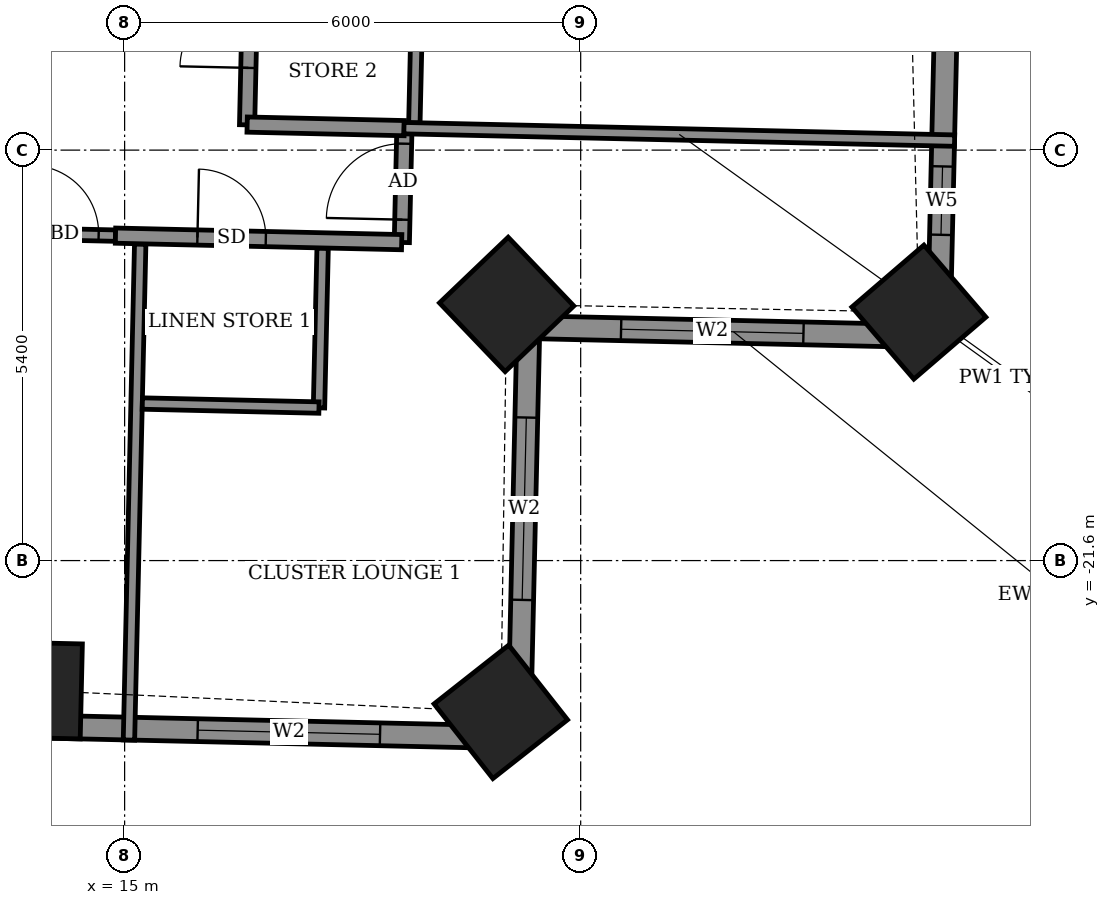
"""IFC4 building model, lengths in metres.
Left out: names, types, materials, properties, quantities, classifications, styles, units other than length and angle.
Written with IfcOpenShell. Run it as: python <this file> out.ifc"""

import sys

from ifc_helpers import new_model, si_unit, direction, frame, frame_2d, origin, origin_2d, place, context, subcontext, project, spatial, rectangle, extrude, element, fill, save


model = new_model("IFC4")
c1 = context("Model", 3, precision=1e-05, world=origin(), true_north=direction((0.0, 1.0)))
c2 = subcontext(c1, "Body", "Model", "MODEL_VIEW")
j1 = project(units=[si_unit("LENGTHUNIT", "METRE"), si_unit("PLANEANGLEUNIT", "RADIAN")], contexts=[c1])
p1 = place(None, origin())
s1 = spatial("IfcSite", under=j1, at=p1, CompositionType="ELEMENT")
p2 = place(p1, origin())
s2 = spatial("IfcBuilding", under=s1, at=p2, CompositionType="ELEMENT")
p3 = place(p2, frame((0.0, 0.0, 163.5)))
s3 = spatial("IfcBuildingStorey", under=s2, at=p3, CompositionType="ELEMENT", Elevation=163.5)
for number, where, z_axis, x_axis in (
    (1, (13.805, -23.307, -0.55), (0.0, 0.0, 1.0), (1.0, -0.023, 0.0)),
    (2, (19.949, -23.59, -0.55), (0.0, 0.0, 1.0), (0.786, 0.619, 0.0)),
    (3, (20.026, -18.23, -0.55), (0.0, 0.0, 1.0), (0.723, 0.691, 0.0)),
    (4, (25.449, -18.331, -0.55), (0.0, 0.0, 1.0), (0.758, 0.652, 0.0)),
):
    element("IfcColumn", number, at=place(p3, frame(where, z_axis=z_axis, x_axis=x_axis)), inside=s3, PredefinedType="COLUMN", context=c2, shape_type="SweptSolid", body=[
        extrude(rectangle(XDim=1.25, YDim=1.25, at=origin_2d()), origin(), (0.0, 0.0, 1.0), 3.6),
    ])
p4 = place(p3, frame((25.71, -18.651, 0.0), z_axis=(0.0, 0.0, 1.0), x_axis=(0.02274444447, 0.999741311663, 0.0)))
e5 = element("IfcWall", 5, at=p4, inside=s3, PredefinedType="SOLIDWALL", context=c2, shape_type="SweptSolid", body=[
    extrude(rectangle(XDim=9.628, YDim=0.3, at=frame_2d((4.814, 0.0))), origin(), (0.0, 0.0, 1.0), 2.55),
])
p5 = place(p4, frame((1.337, 0.0, 0.9)))
e6 = element("IfcOpeningElement", 6, at=p5, cuts=e5, PredefinedType="OPENING", context=c2, shape_type="SweptSolid", body=[
    extrude(rectangle(XDim=0.9, YDim=1.5, at=frame_2d((0.45, 0.75))), frame((0.0, 0.16, 0.0), z_axis=(0.0, -1.0, 0.0), x_axis=(1.0, 0.0, 0.0)), (0.0, 0.0, 1.0), 0.32),
])
p6 = place(p4, frame((5.481, 0.0, 0.0)))
e7 = element("IfcOpeningElement", 7, at=p6, cuts=e5, PredefinedType="OPENING", context=c2, shape_type="SweptSolid", body=[
    extrude(rectangle(XDim=1.2, YDim=2.4, at=frame_2d((0.6, 1.2))), frame((0.0, 0.16, 0.0), z_axis=(0.0, -1.0, 0.0), x_axis=(1.0, 0.0, 0.0)), (0.0, 0.0, 1.0), 0.32),
])
p7 = place(p4, frame((7.512, 0.0, 0.9)))
e8 = element("IfcOpeningElement", 8, at=p7, cuts=e5, PredefinedType="OPENING", context=c2, shape_type="SweptSolid", body=[
    extrude(rectangle(XDim=1.2, YDim=1.5, at=frame_2d((0.6, 0.75))), frame((0.0, 0.16, 0.0), z_axis=(0.0, -1.0, 0.0), x_axis=(1.0, 0.0, 0.0)), (0.0, 0.0, 1.0), 0.32),
])
p8 = place(p3, frame((-18.781, -23.043, 0.0), z_axis=(0.0, 0.0, 1.0), x_axis=(0.999742794992, -0.022679150367, 0.0)))
e9 = element("IfcWall", 9, at=p8, inside=s3, PredefinedType="SOLIDWALL", context=c2, shape_type="SweptSolid", body=[
    extrude(rectangle(XDim=38.98, YDim=0.3, at=frame_2d((19.49, 0.0))), origin(), (0.0, 0.0, 1.0), 3.05),
])
p9 = place(p8, frame((1.215, 0.0, 0.0)))
e10 = element("IfcOpeningElement", 10, at=p9, cuts=e9, PredefinedType="OPENING", context=c2, shape_type="SweptSolid", body=[
    extrude(rectangle(XDim=1.5, YDim=2.4, at=frame_2d((0.75, 1.2))), frame((0.0, 0.16, 0.0), z_axis=(0.0, -1.0, 0.0), x_axis=(1.0, 0.0, 0.0)), (0.0, 0.0, 1.0), 0.32),
])
p10 = place(p8, frame((3.811, 0.0, 0.0)))
e11 = element("IfcOpeningElement", 11, at=p10, cuts=e9, PredefinedType="OPENING", context=c2, shape_type="SweptSolid", body=[
    extrude(rectangle(XDim=1.5, YDim=2.4, at=frame_2d((0.75, 1.2))), frame((0.0, 0.16, 0.0), z_axis=(0.0, -1.0, 0.0), x_axis=(1.0, 0.0, 0.0)), (0.0, 0.0, 1.0), 0.32),
])
p11 = place(p8, frame((9.0, 0.0, 0.0)))
e12 = element("IfcOpeningElement", 12, at=p11, cuts=e9, PredefinedType="OPENING", context=c2, shape_type="SweptSolid", body=[
    extrude(rectangle(XDim=1.5, YDim=2.4, at=frame_2d((0.75, 1.2))), frame((0.0, 0.16, 0.0), z_axis=(0.0, -1.0, 0.0), x_axis=(1.0, 0.0, 0.0)), (0.0, 0.0, 1.0), 0.32),
])
p12 = place(p8, frame((14.109, 0.0, 0.0)))
e13 = element("IfcOpeningElement", 13, at=p12, cuts=e9, PredefinedType="OPENING", context=c2, shape_type="SweptSolid", body=[
    extrude(rectangle(XDim=1.5, YDim=2.4, at=frame_2d((0.75, 1.2))), frame((0.0, 0.16, 0.0), z_axis=(0.0, -1.0, 0.0), x_axis=(1.0, 0.0, 0.0)), (0.0, 0.0, 1.0), 0.32),
])
p13 = place(p8, frame((17.008, 0.0, 0.0)))
e14 = element("IfcOpeningElement", 14, at=p13, cuts=e9, PredefinedType="OPENING", context=c2, shape_type="SweptSolid", body=[
    extrude(rectangle(XDim=1.5, YDim=2.4, at=frame_2d((0.75, 1.2))), frame((0.0, 0.16, 0.0), z_axis=(0.0, -1.0, 0.0), x_axis=(1.0, 0.0, 0.0)), (0.0, 0.0, 1.0), 0.32),
])
p14 = place(p8, frame((22.225, 0.0, 0.0)))
e15 = element("IfcOpeningElement", 15, at=p14, cuts=e9, PredefinedType="OPENING", context=c2, shape_type="SweptSolid", body=[
    extrude(rectangle(XDim=1.5, YDim=2.4, at=frame_2d((0.75, 1.2))), frame((0.0, 0.16, 0.0), z_axis=(0.0, -1.0, 0.0), x_axis=(1.0, 0.0, 0.0)), (0.0, 0.0, 1.0), 0.32),
])
p15 = place(p8, frame((27.181, 0.0, 0.0)))
e16 = element("IfcOpeningElement", 16, at=p15, cuts=e9, PredefinedType="OPENING", context=c2, shape_type="SweptSolid", body=[
    extrude(rectangle(XDim=1.5, YDim=2.4, at=frame_2d((0.75, 1.2))), frame((0.0, 0.16, 0.0), z_axis=(0.0, -1.0, 0.0), x_axis=(1.0, 0.0, 0.0)), (0.0, 0.0, 1.0), 0.32),
])
p16 = place(p8, frame((30.079, 0.0, 0.0)))
e17 = element("IfcOpeningElement", 17, at=p16, cuts=e9, PredefinedType="OPENING", context=c2, shape_type="SweptSolid", body=[
    extrude(rectangle(XDim=1.5, YDim=2.4, at=frame_2d((0.75, 1.2))), frame((0.0, 0.16, 0.0), z_axis=(0.0, -1.0, 0.0), x_axis=(1.0, 0.0, 0.0)), (0.0, 0.0, 1.0), 0.32),
])
p17 = place(p8, frame((34.751, 0.0, 0.9)))
e18 = element("IfcOpeningElement", 18, at=p17, cuts=e9, PredefinedType="OPENING", context=c2, shape_type="SweptSolid", body=[
    extrude(rectangle(XDim=2.4, YDim=1.5, at=frame_2d((1.2, 0.75))), frame((0.0, 0.16, 0.0), z_axis=(0.0, -1.0, 0.0), x_axis=(1.0, 0.0, 0.0)), (0.0, 0.0, 1.0), 0.32),
])
p18 = place(p3, frame((20.189, -23.927, 0.0), z_axis=(0.0, 0.0, 1.0), x_axis=(0.022789195272, 0.999740292565, 0.0)))
e19 = element("IfcWall", 19, at=p18, inside=s3, PredefinedType="SOLIDWALL", context=c2, shape_type="SweptSolid", body=[
    extrude(rectangle(XDim=5.399, YDim=0.3, at=frame_2d((2.7, 0.0))), origin(), (0.0, 0.0, 1.0), 2.55),
])
p19 = place(p18, frame((1.81, 0.0, 0.9)))
e20 = element("IfcOpeningElement", 20, at=p19, cuts=e19, PredefinedType="OPENING", context=c2, shape_type="SweptSolid", body=[
    extrude(rectangle(XDim=2.4, YDim=1.5, at=frame_2d((1.2, 0.75))), frame((0.0, 0.16, 0.0), z_axis=(0.0, -1.0, 0.0), x_axis=(1.0, 0.0, 0.0)), (0.0, 0.0, 1.0), 0.32),
])
p20 = place(p3, frame((20.312, -18.529, 0.0), z_axis=(0.0, 0.0, 1.0), x_axis=(0.999745417973, -0.02256322766, 0.0)))
e21 = element("IfcWall", 21, at=p20, inside=s3, PredefinedType="SOLIDWALL", context=c2, shape_type="SweptSolid", body=[
    extrude(rectangle(XDim=5.399, YDim=0.3, at=frame_2d((2.7, 0.0))), origin(), (0.0, 0.0, 1.0), 2.55),
])
p21 = place(p20, frame((1.22, 0.0, 0.9)))
e22 = element("IfcOpeningElement", 22, at=p21, cuts=e21, PredefinedType="OPENING", context=c2, shape_type="SweptSolid", body=[
    extrude(rectangle(XDim=2.4, YDim=1.5, at=frame_2d((1.2, 0.75))), frame((0.0, 0.16, 0.0), z_axis=(0.0, -1.0, 0.0), x_axis=(1.0, 0.0, 0.0)), (0.0, 0.0, 1.0), 0.32),
])
p22 = place(p3, frame((15.057, -23.961, 0.0), z_axis=(0.0, 0.0, 1.0), x_axis=(0.022709507457, 0.999742105881, 0.0)))
e23 = element("IfcWall", 23, at=p22, inside=s3, PredefinedType="PARTITIONING", context=c2, shape_type="SweptSolid", body=[
    extrude(rectangle(XDim=6.526, YDim=0.15, at=frame_2d((3.263, 0.0))), origin(), (0.0, 0.0, 1.0), 2.55),
])
p23 = place(p3, frame((17.557, -19.591, 0.0), z_axis=(0.0, 0.0, 1.0), x_axis=(0.022895647347, 0.999737860308, 0.0)))
e24 = element("IfcWall", 24, at=p23, inside=s3, PredefinedType="PARTITIONING", context=c2, shape_type="SweptSolid", body=[
    extrude(rectangle(XDim=2.101, YDim=0.15, at=frame_2d((1.05, 0.0))), origin(), (0.0, 0.0, 1.0), 3.05),
])
p24 = place(p3, frame((15.233, -19.534, 0.0), z_axis=(0.0, 0.0, 1.0), x_axis=(0.999740260747, -0.02279059109, 0.0)))
e25 = element("IfcWall", 25, at=p24, inside=s3, PredefinedType="PARTITIONING", context=c2, shape_type="SweptSolid", body=[
    extrude(rectangle(XDim=2.324, YDim=0.15, at=frame_2d((1.162, 0.0))), origin(), (0.0, 0.0, 1.0), 3.05),
])
p25 = place(p3, frame((18.647, -17.415, 0.0), z_axis=(0.0, 0.0, 1.0), x_axis=(0.022617910375, 0.999744182344, 0.0)))
e26 = element("IfcWall", 26, at=p25, inside=s3, PredefinedType="PARTITIONING", context=c2, shape_type="SweptSolid", body=[
    extrude(rectangle(XDim=1.5, YDim=0.2, at=frame_2d((0.75, 0.0))), origin(), (0.0, 0.0, 1.0), 3.05),
])
p26 = place(p25, frame((0.3, 0.0, 0.0)))
e27 = element("IfcOpeningElement", 27, at=p26, cuts=e26, PredefinedType="OPENING", context=c2, shape_type="SweptSolid", body=[
    extrude(rectangle(XDim=1.0, YDim=2.1, at=frame_2d((0.5, 1.05))), frame((0.0, 0.11, 0.0), z_axis=(0.0, -1.0, 0.0), x_axis=(1.0, 0.0, 0.0)), (0.0, 0.0, 1.0), 0.22),
])
p27 = place(p3, frame((-15.649, -16.633, 0.0), z_axis=(0.0, 0.0, 1.0), x_axis=(0.999743261737, -0.022658565952, 0.0)))
e28 = element("IfcWall", 28, at=p27, inside=s3, PredefinedType="PARTITIONING", context=c2, shape_type="SweptSolid", body=[
    extrude(rectangle(XDim=30.536, YDim=0.15, at=frame_2d((15.268, 0.0))), origin(), (0.0, 0.0, 1.0), 3.05),
])
p28 = place(p27, frame((3.09, 0.0, 0.0)))
e29 = element("IfcOpeningElement", 29, at=p28, cuts=e28, PredefinedType="OPENING", context=c2, shape_type="SweptSolid", body=[
    extrude(rectangle(XDim=0.9, YDim=2.1, at=frame_2d((0.45, 1.05))), frame((0.0, 0.085, 0.0), z_axis=(0.0, -1.0, 0.0), x_axis=(1.0, 0.0, 0.0)), (0.0, 0.0, 1.0), 0.17),
])
p29 = place(p27, frame((5.115, 0.0, 0.0)))
e30 = element("IfcOpeningElement", 30, at=p29, cuts=e28, PredefinedType="OPENING", context=c2, shape_type="SweptSolid", body=[
    extrude(rectangle(XDim=0.9, YDim=2.1, at=frame_2d((0.45, 1.05))), frame((0.0, 0.085, 0.0), z_axis=(0.0, -1.0, 0.0), x_axis=(1.0, 0.0, 0.0)), (0.0, 0.0, 1.0), 0.17),
])
p30 = place(p27, frame((11.94, 0.0, 0.0)))
e31 = element("IfcOpeningElement", 31, at=p30, cuts=e28, PredefinedType="OPENING", context=c2, shape_type="SweptSolid", body=[
    extrude(rectangle(XDim=0.9, YDim=2.1, at=frame_2d((0.45, 1.05))), frame((0.0, 0.085, 0.0), z_axis=(0.0, -1.0, 0.0), x_axis=(1.0, 0.0, 0.0)), (0.0, 0.0, 1.0), 0.17),
])
p31 = place(p27, frame((13.965, 0.0, 0.0)))
e32 = element("IfcOpeningElement", 32, at=p31, cuts=e28, PredefinedType="OPENING", context=c2, shape_type="SweptSolid", body=[
    extrude(rectangle(XDim=0.9, YDim=2.1, at=frame_2d((0.45, 1.05))), frame((0.0, 0.085, 0.0), z_axis=(0.0, -1.0, 0.0), x_axis=(1.0, 0.0, 0.0)), (0.0, 0.0, 1.0), 0.17),
])
p32 = place(p27, frame((20.74, 0.0, 0.0)))
e33 = element("IfcOpeningElement", 33, at=p32, cuts=e28, PredefinedType="OPENING", context=c2, shape_type="SweptSolid", body=[
    extrude(rectangle(XDim=0.9, YDim=2.1, at=frame_2d((0.45, 1.05))), frame((0.0, 0.085, 0.0), z_axis=(0.0, -1.0, 0.0), x_axis=(1.0, 0.0, 0.0)), (0.0, 0.0, 1.0), 0.17),
])
p33 = place(p27, frame((22.665, 0.0, 0.0)))
e34 = element("IfcOpeningElement", 34, at=p33, cuts=e28, PredefinedType="OPENING", context=c2, shape_type="SweptSolid", body=[
    extrude(rectangle(XDim=0.9, YDim=2.1, at=frame_2d((0.45, 1.05))), frame((0.0, 0.085, 0.0), z_axis=(0.0, -1.0, 0.0), x_axis=(1.0, 0.0, 0.0)), (0.0, 0.0, 1.0), 0.17),
])
p34 = place(p27, frame((29.415, 0.0, 0.0)))
e35 = element("IfcOpeningElement", 35, at=p34, cuts=e28, PredefinedType="OPENING", context=c2, shape_type="SweptSolid", body=[
    extrude(rectangle(XDim=0.9, YDim=2.1, at=frame_2d((0.45, 1.05))), frame((0.0, 0.085, 0.0), z_axis=(0.0, -1.0, 0.0), x_axis=(1.0, 0.0, 0.0)), (0.0, 0.0, 1.0), 0.17),
])
p35 = place(p3, frame((14.88, -17.325, 0.0), z_axis=(0.0, 0.0, 1.0), x_axis=(0.999739622, -0.022818593369, 0.0)))
e36 = element("IfcWall", 36, at=p35, inside=s3, PredefinedType="PARTITIONING", context=c2, shape_type="SweptSolid", body=[
    extrude(rectangle(XDim=3.766, YDim=0.2, at=frame_2d((1.883, 0.0))), origin(), (0.0, 0.0, 1.0), 3.05),
])
p36 = place(p35, frame((1.078, 0.0, 0.0)))
e37 = element("IfcOpeningElement", 37, at=p36, cuts=e36, PredefinedType="OPENING", context=c2, shape_type="SweptSolid", body=[
    extrude(rectangle(XDim=0.9, YDim=2.1, at=frame_2d((0.45, 1.05))), frame((0.0, 0.11, 0.0), z_axis=(0.0, -1.0, 0.0), x_axis=(1.0, 0.0, 0.0)), (0.0, 0.0, 1.0), 0.22),
])
p37 = place(p3, frame((16.611, -15.868, 0.0), z_axis=(0.0, 0.0, 1.0), x_axis=(0.022698399288, 0.999742358145, 0.0)))
e38 = element("IfcWall", 38, at=p37, inside=s3, PredefinedType="PARTITIONING", context=c2, shape_type="SweptSolid", body=[
    extrude(rectangle(XDim=8.196, YDim=0.2, at=frame_2d((4.098, 0.0))), origin(), (0.0, 0.0, 1.0), 3.05),
])
p38 = place(p37, frame((2.95, 0.0, 0.0)))
e39 = element("IfcOpeningElement", 39, at=p38, cuts=e38, PredefinedType="OPENING", context=c2, shape_type="SweptSolid", body=[
    extrude(rectangle(XDim=1.0, YDim=2.1, at=frame_2d((0.5, 1.05))), frame((0.0, 0.11, 0.0), z_axis=(0.0, -1.0, 0.0), x_axis=(1.0, 0.0, 0.0)), (0.0, 0.0, 1.0), 0.22),
])
p39 = place(p37, frame((0.75, 0.0, 0.0)))
e40 = element("IfcOpeningElement", 40, at=p39, cuts=e38, PredefinedType="OPENING", context=c2, shape_type="SweptSolid", body=[
    extrude(rectangle(XDim=0.9, YDim=2.1, at=frame_2d((0.45, 1.05))), frame((0.0, 0.11, 0.0), z_axis=(0.0, -1.0, 0.0), x_axis=(1.0, 0.0, 0.0)), (0.0, 0.0, 1.0), 0.22),
])
p40 = place(p37, frame((5.761, 0.0, 0.0)))
e41 = element("IfcOpeningElement", 41, at=p40, cuts=e38, PredefinedType="OPENING", context=c2, shape_type="SweptSolid", body=[
    extrude(rectangle(XDim=1.0, YDim=2.1, at=frame_2d((0.5, 1.05))), frame((0.0, 0.11, 0.0), z_axis=(0.0, -1.0, 0.0), x_axis=(1.0, 0.0, 0.0)), (0.0, 0.0, 1.0), 0.22),
])
p41 = place(p3, frame((18.812, -15.843, 0.0), z_axis=(0.0, 0.0, 1.0), x_axis=(0.02279059109, 0.999740260747, 0.0)))
e42 = element("IfcWall", 42, at=p41, inside=s3, PredefinedType="PARTITIONING", context=c2, shape_type="SweptSolid", body=[
    extrude(rectangle(XDim=2.324, YDim=0.15, at=frame_2d((1.162, 0.0))), origin(), (0.0, 0.0, 1.0), 3.05),
])
p42 = place(p3, frame((16.612, -15.864, 0.0), z_axis=(0.0, 0.0, 1.0), x_axis=(0.999742931749, -0.02267312106, 0.0)))
e43 = element("IfcWall", 43, at=p42, inside=s3, PredefinedType="PARTITIONING", context=c2, shape_type="SweptSolid", body=[
    extrude(rectangle(XDim=2.067, YDim=0.2, at=frame_2d((1.034, 0.0))), origin(), (0.0, 0.0, 1.0), 3.05),
])
p43 = place(p3, frame((18.675, -15.911, 0.0), z_axis=(0.0, 0.0, 1.0), x_axis=(0.999743624132, -0.022642570706, 0.0)))
e44 = element("IfcWall", 44, at=p43, inside=s3, PredefinedType="PARTITIONING", context=c2, shape_type="SweptSolid", body=[
    extrude(rectangle(XDim=7.246, YDim=0.15, at=frame_2d((3.623, 0.0))), origin(), (0.0, 0.0, 1.0), 2.55),
])
p44 = place(p5, origin())
e45 = element("IfcWindow", 45, at=p44, inside=s3, PartitioningType="SINGLE_PANEL", PredefinedType="WINDOW", context=c2, shape_type="SweptSolid", body=[
    extrude(rectangle(XDim=0.9, YDim=1.5, at=frame_2d((0.45, 0.75))), frame((0.0, 0.03, 0.0), z_axis=(0.0, -1.0, 0.0), x_axis=(1.0, 0.0, 0.0)), (0.0, 0.0, 1.0), 0.06),
])
fill(e6, e45)
p45 = place(p17, origin())
e46 = element("IfcWindow", 46, at=p45, inside=s3, PartitioningType="DOUBLE_PANEL_VERTICAL", PredefinedType="WINDOW", context=c2, shape_type="SweptSolid", body=[
    extrude(rectangle(XDim=2.4, YDim=1.5, at=frame_2d((1.2, 0.75))), frame((0.0, 0.03, 0.0), z_axis=(0.0, -1.0, 0.0), x_axis=(1.0, 0.0, 0.0)), (0.0, 0.0, 1.0), 0.06),
])
fill(e18, e46)
p46 = place(p19, origin())
e47 = element("IfcWindow", 47, at=p46, inside=s3, PartitioningType="DOUBLE_PANEL_VERTICAL", PredefinedType="WINDOW", context=c2, shape_type="SweptSolid", body=[
    extrude(rectangle(XDim=2.4, YDim=1.5, at=frame_2d((1.2, 0.75))), frame((0.0, 0.03, 0.0), z_axis=(0.0, -1.0, 0.0), x_axis=(1.0, 0.0, 0.0)), (0.0, 0.0, 1.0), 0.06),
])
fill(e20, e47)
p47 = place(p21, origin())
e48 = element("IfcWindow", 48, at=p47, inside=s3, PartitioningType="DOUBLE_PANEL_VERTICAL", PredefinedType="WINDOW", context=c2, shape_type="SweptSolid", body=[
    extrude(rectangle(XDim=2.4, YDim=1.5, at=frame_2d((1.2, 0.75))), frame((0.0, 0.03, 0.0), z_axis=(0.0, -1.0, 0.0), x_axis=(1.0, 0.0, 0.0)), (0.0, 0.0, 1.0), 0.06),
])
fill(e22, e48)
p48 = place(p34, origin())
e49 = element("IfcDoor", 49, at=p48, inside=s3, OperationType="SINGLE_SWING_LEFT", PredefinedType="DOOR", context=c2, shape_type="SweptSolid", body=[
    extrude(rectangle(XDim=0.9, YDim=2.1, at=frame_2d((0.45, 1.05))), frame((0.0, 0.025, 0.0), z_axis=(0.0, -1.0, 0.0), x_axis=(1.0, 0.0, 0.0)), (0.0, 0.0, 1.0), 0.05),
])
fill(e35, e49)
p49 = place(p26, origin())
e50 = element("IfcDoor", 50, at=p49, inside=s3, OperationType="SINGLE_SWING_RIGHT", PredefinedType="DOOR", context=c2, shape_type="SweptSolid", body=[
    extrude(rectangle(XDim=1.0, YDim=2.1, at=frame_2d((0.5, 1.05))), frame((0.0, 0.025, 0.0), z_axis=(0.0, -1.0, 0.0), x_axis=(1.0, 0.0, 0.0)), (0.0, 0.0, 1.0), 0.05),
])
fill(e27, e50)
p50 = place(p36, origin())
e51 = element("IfcDoor", 51, at=p50, inside=s3, OperationType="SINGLE_SWING_LEFT", PredefinedType="DOOR", context=c2, shape_type="SweptSolid", body=[
    extrude(rectangle(XDim=0.9, YDim=2.1, at=frame_2d((0.45, 1.05))), frame((0.0, 0.025, 0.0), z_axis=(0.0, -1.0, 0.0), x_axis=(1.0, 0.0, 0.0)), (0.0, 0.0, 1.0), 0.05),
])
fill(e37, e51)
p51 = place(p39, origin())
e52 = element("IfcDoor", 52, at=p51, inside=s3, OperationType="SINGLE_SWING_RIGHT", PredefinedType="DOOR", context=c2, shape_type="SweptSolid", body=[
    extrude(rectangle(XDim=0.9, YDim=2.1, at=frame_2d((0.45, 1.05))), frame((0.0, 0.025, 0.0), z_axis=(0.0, -1.0, 0.0), x_axis=(1.0, 0.0, 0.0)), (0.0, 0.0, 1.0), 0.05),
])
fill(e40, e52)
save(model, sys.argv[1])
